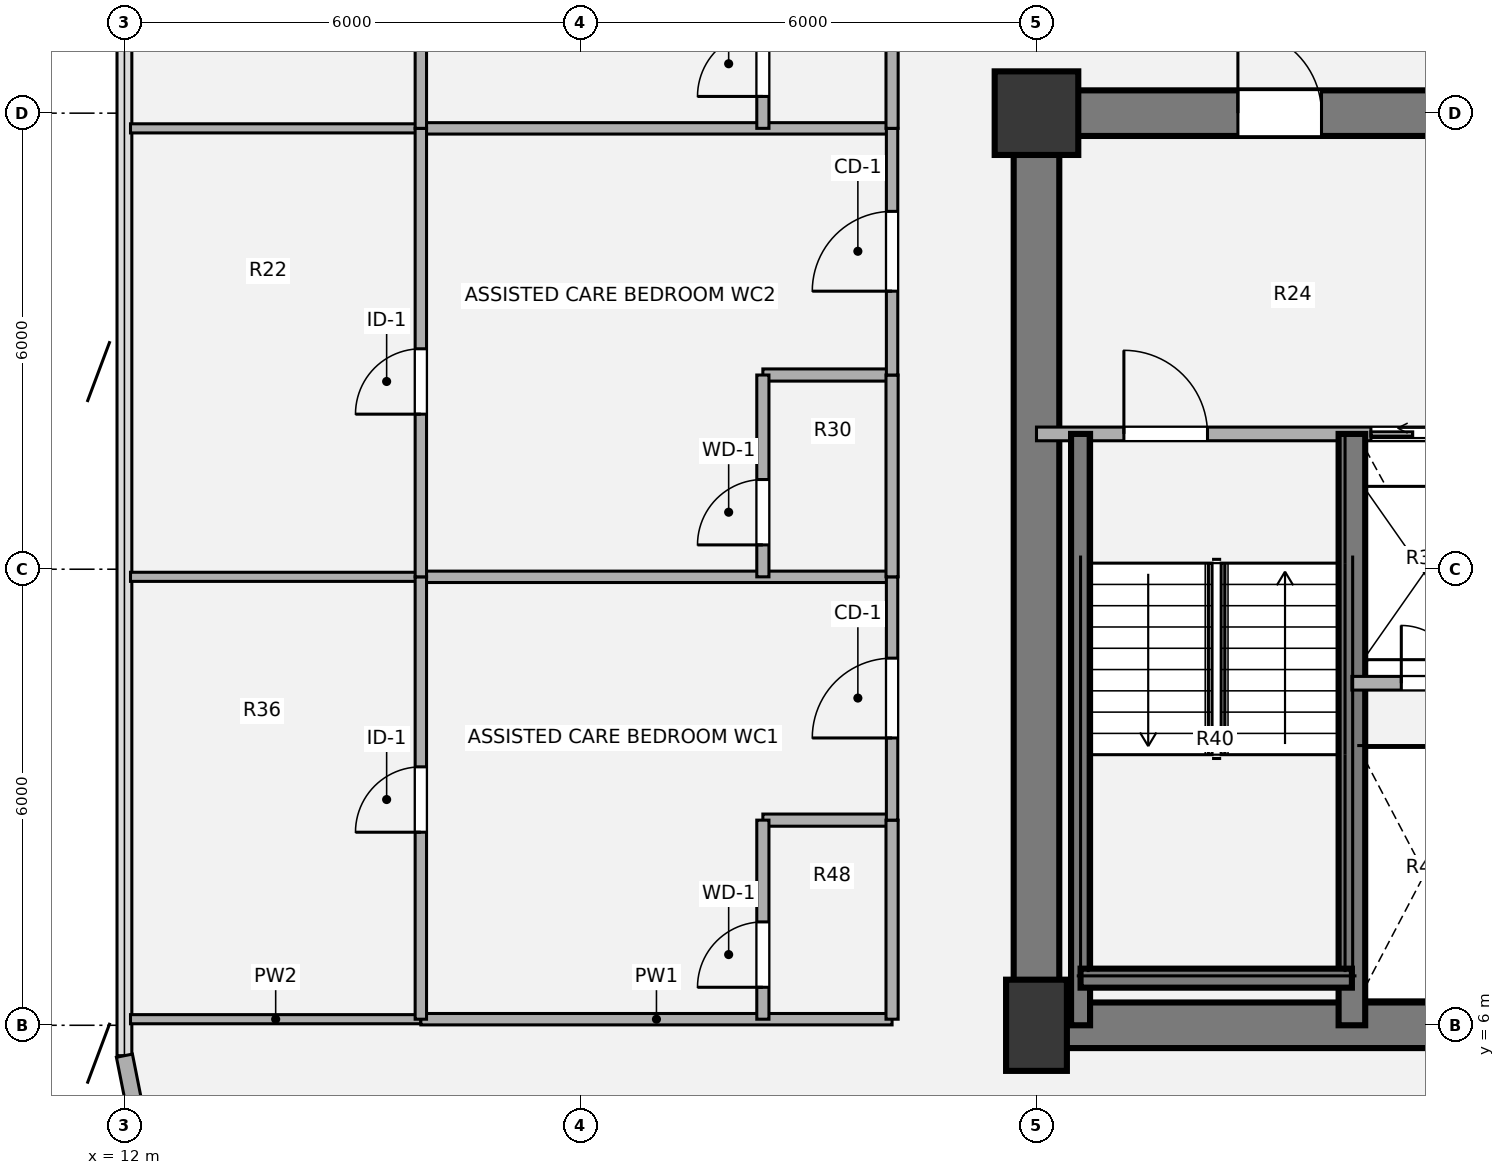
"""IFC4 building model, lengths in metres.
Left out: names, types, materials, properties, quantities, classifications, styles, units other than length and angle.
Written with IfcOpenShell. Run it as: python <this file> out.ifc"""

import sys

from ifc_helpers import new_model, si_unit, direction, frame, frame_2d, origin, origin_2d, place, context, subcontext, project, spatial, rectangle, extrude, source, transform, mapped, element, fill, save


model = new_model("IFC4")
c1 = context("Model", 3, precision=1e-05, world=origin(), true_north=direction((0.0, 1.0)))
c2 = subcontext(c1, "Body", "Model", "MODEL_VIEW")
j1 = project(units=[si_unit("LENGTHUNIT", "METRE"), si_unit("PLANEANGLEUNIT", "RADIAN")], contexts=[c1])
p1 = place(None, origin())
s1 = spatial("IfcSite", under=j1, at=p1, CompositionType="ELEMENT")
p2 = place(p1, origin())
s2 = spatial("IfcBuilding", under=s1, at=p2, CompositionType="ELEMENT")
p3 = place(p2, frame((0.0, 0.0, 38.34)))
s3 = spatial("IfcBuildingStorey", under=s2, at=p3, CompositionType="ELEMENT", Elevation=38.34)
m1 = source(origin(), c2, "Body", "SweptSolid", [
    extrude(rectangle(XDim=0.8, YDim=1.2, at=origin_2d()), origin(), (0.0, 0.0, 1.0), 3.78),
])
p4 = place(p3, frame((24.0, 6.0, 0.0), z_axis=(0.0, 0.0, 1.0), x_axis=(1.0, 0.0, 0.0)))
e1 = element("IfcColumn", 1, at=p4, inside=s3, PredefinedType="COLUMN", context=c2, shape_type="MappedRepresentation", body=[
    mapped(m1, transform((0.0, 0.0, 0.0), x_axis=(1.0, 0.0, 0.0), y_axis=(0.0, 1.0, 0.0), z_axis=(0.0, 0.0, 1.0), scale=1.0)),
])
m2 = source(origin(), c2, "Body", "SweptSolid", [
    extrude(rectangle(XDim=1.1, YDim=1.1, at=origin_2d()), origin(), (0.0, 0.0, 1.0), 3.78),
])
p5 = place(p3, frame((24.0, 18.0, 0.0), z_axis=(0.0, 0.0, 1.0), x_axis=(1.0, 0.0, 0.0)))
e2 = element("IfcColumn", 2, at=p5, inside=s3, PredefinedType="COLUMN", context=c2, shape_type="MappedRepresentation", body=[
    mapped(m2, transform((0.0, 0.0, 0.0), x_axis=(1.0, 0.0, 0.0), y_axis=(0.0, 1.0, 0.0), z_axis=(0.0, 0.0, 1.0), scale=1.0)),
])
p6 = place(p3, frame((48.3, 6.0, 0.0), z_axis=(0.0, 0.0, 1.0), x_axis=(-1.0, 0.0, 0.0)))
e3 = element("IfcWall", 3, at=p6, inside=s3, PredefinedType="SHEAR", context=c2, shape_type="SweptSolid", body=[
    extrude(rectangle(XDim=24.6, YDim=0.6, at=frame_2d((12.3, 0.0))), origin(), (0.0, 0.0, 1.0), 3.78),
])
p7 = place(p3, frame((24.0, 6.0, 0.0), z_axis=(0.0, 0.0, 1.0), x_axis=(0.0, 1.0, 0.0)))
e4 = element("IfcWall", 4, at=p7, inside=s3, PredefinedType="SHEAR", context=c2, shape_type="SweptSolid", body=[
    extrude(rectangle(XDim=12.0, YDim=0.6, at=frame_2d((6.0, 0.0))), origin(), (0.0, 0.0, 1.0), 3.78),
])
p8 = place(p3, frame((23.7, 18.0, 0.0), z_axis=(0.0, 0.0, 1.0), x_axis=(1.0, 0.0, 0.0)))
e5 = element("IfcWall", 5, at=p8, inside=s3, PredefinedType="SHEAR", context=c2, shape_type="SweptSolid", body=[
    extrude(rectangle(XDim=9.5, YDim=0.6, at=frame_2d((4.75, 0.0))), origin(), (0.0, 0.0, 1.0), 3.78),
])
p9 = place(p8, frame((2.95, 0.0, 0.0)))
e6 = element("IfcOpeningElement", 6, at=p9, cuts=e5, PredefinedType="OPENING", context=c2, shape_type="SweptSolid", body=[
    extrude(rectangle(XDim=1.1, YDim=2.1, at=origin_2d()), frame((0.55, 0.31, 1.05), z_axis=(0.0, -1.0, 0.0), x_axis=(1.0, 0.0, 0.0)), (0.0, 0.0, 1.0), 0.62),
])
p10 = place(p3, frame((12.244, 4.375, 0.0), z_axis=(0.0, 0.0, 1.0), x_axis=(-0.195138390419, 0.980775717779, 0.0)))
e7 = element("IfcWall", 7, at=p10, inside=s3, PredefinedType="SOLIDWALL", context=c2, shape_type="SweptSolid", body=[
    extrude(rectangle(XDim=1.249, YDim=0.215, at=frame_2d((0.624, 0.0))), origin(), (0.0, 0.0, 1.0), 3.53),
])
p11 = place(p3, frame((24.0, 13.78, 0.0), z_axis=(0.0, 0.0, 1.0), x_axis=(1.0, 0.0, 0.0)))
e8 = element("IfcWall", 8, at=p11, inside=s3, PredefinedType="PARTITIONING", context=c2, shape_type="SweptSolid", body=[
    extrude(rectangle(XDim=6.1, YDim=0.18, at=frame_2d((3.05, 0.0))), origin(), (0.0, 0.0, 1.0), 3.5),
])
p12 = place(p11, frame((1.15, 0.0, 0.0)))
e9 = element("IfcOpeningElement", 9, at=p12, cuts=e8, PredefinedType="OPENING", context=c2, shape_type="SweptSolid", body=[
    extrude(rectangle(XDim=1.1, YDim=2.1, at=origin_2d()), frame((0.55, 0.1, 1.05), z_axis=(0.0, -1.0, 0.0), x_axis=(1.0, 0.0, 0.0)), (0.0, 0.0, 1.0), 0.2),
])
p13 = place(p11, frame((4.4, 0.0, 0.0)))
e10 = element("IfcOpeningElement", 10, at=p13, cuts=e8, PredefinedType="OPENING", context=c2, shape_type="SweptSolid", body=[
    extrude(rectangle(XDim=1.1, YDim=2.1, at=origin_2d()), frame((0.55, 0.1, 1.05), z_axis=(0.0, -1.0, 0.0), x_axis=(1.0, 0.0, 0.0)), (0.0, 0.0, 1.0), 0.2),
])
p14 = place(p3, frame((28.15, 6.0, 0.0), z_axis=(0.0, 0.0, 1.0), x_axis=(0.0, 1.0, 0.0)))
e11 = element("IfcWall", 11, at=p14, inside=s3, PredefinedType="SHEAR", context=c2, shape_type="SweptSolid", body=[
    extrude(rectangle(XDim=7.78, YDim=0.35, at=frame_2d((3.89, 0.0))), origin(), (0.0, 0.0, 1.0), 3.85),
])
p15 = place(p3, frame((24.58, 6.0, 0.0), z_axis=(0.0, 0.0, 1.0), x_axis=(0.0, 1.0, 0.0)))
e12 = element("IfcWall", 12, at=p15, inside=s3, PredefinedType="SHEAR", context=c2, shape_type="SweptSolid", body=[
    extrude(rectangle(XDim=7.78, YDim=0.25, at=frame_2d((3.89, 0.0))), origin(), (0.0, 0.0, 1.0), 3.85),
])
p16 = place(p3, frame((24.58, 6.62, 0.0), z_axis=(0.0, 0.0, 1.0), x_axis=(1.0, 0.0, 0.0)))
e13 = element("IfcWall", 13, at=p16, inside=s3, PredefinedType="SHEAR", context=c2, shape_type="SweptSolid", body=[
    extrude(rectangle(XDim=3.57, YDim=0.25, at=frame_2d((1.785, 0.0))), origin(), (0.0, 0.0, 1.0), 3.85),
])
p17 = place(p3, frame((28.15, 10.5, 0.0), z_axis=(0.0, 0.0, 1.0), x_axis=(1.0, 0.0, 0.0)))
e14 = element("IfcWall", 14, at=p17, inside=s3, PredefinedType="PARTITIONING", context=c2, shape_type="SweptSolid", body=[
    extrude(rectangle(XDim=1.95, YDim=0.18, at=frame_2d((0.975, 0.0))), origin(), (0.0, 0.0, 1.0), 3.5),
])
p18 = place(p17, frame((0.65, 0.0, 0.0)))
e15 = element("IfcOpeningElement", 15, at=p18, cuts=e14, PredefinedType="OPENING", context=c2, shape_type="SweptSolid", body=[
    extrude(rectangle(XDim=0.76, YDim=2.05, at=origin_2d()), frame((0.38, 0.1, 1.025), z_axis=(0.0, -1.0, 0.0), x_axis=(1.0, 0.0, 0.0)), (0.0, 0.0, 1.0), 0.2),
])
p19 = place(p3, frame((12.08, 6.08, 0.0), z_axis=(0.0, 0.0, 1.0), x_axis=(1.0, 0.0, 0.0)))
e16 = element("IfcWall", 16, at=p19, inside=s3, PredefinedType="PARTITIONING", context=c2, shape_type="SweptSolid", body=[
    extrude(rectangle(XDim=3.82, YDim=0.12, at=frame_2d((1.91, 0.0))), origin(), (0.0, 0.0, 1.0), 3.5),
])
p20 = place(p3, frame((15.9, 6.08, 0.0), z_axis=(0.0, 0.0, 1.0), x_axis=(1.0, 0.0, 0.0)))
e17 = element("IfcWall", 17, at=p20, inside=s3, PredefinedType="PARTITIONING", context=c2, shape_type="SweptSolid", body=[
    extrude(rectangle(XDim=6.2, YDim=0.15, at=frame_2d((3.1, 0.0))), origin(), (0.0, 0.0, 1.0), 3.5),
])
p21 = place(p3, frame((20.4, 8.699, 0.0), z_axis=(0.0, 0.0, 1.0), x_axis=(1.0, 0.0, 0.0)))
e18 = element("IfcWall", 18, at=p21, inside=s3, PredefinedType="PLUMBINGWALL", context=c2, shape_type="SweptSolid", body=[
    extrude(rectangle(XDim=1.7, YDim=0.16, at=frame_2d((0.85, 0.0))), origin(), (0.0, 0.0, 1.0), 3.5),
])
p22 = place(p3, frame((12.08, 11.9, 0.0), z_axis=(0.0, 0.0, 1.0), x_axis=(1.0, 0.0, 0.0)))
e19 = element("IfcWall", 19, at=p22, inside=s3, PredefinedType="PARTITIONING", context=c2, shape_type="SweptSolid", body=[
    extrude(rectangle(XDim=3.82, YDim=0.12, at=frame_2d((1.91, 0.0))), origin(), (0.0, 0.0, 1.0), 3.5),
])
p23 = place(p3, frame((15.9, 11.9, 0.0), z_axis=(0.0, 0.0, 1.0), x_axis=(1.0, 0.0, 0.0)))
e20 = element("IfcWall", 20, at=p23, inside=s3, PredefinedType="PARTITIONING", context=c2, shape_type="SweptSolid", body=[
    extrude(rectangle(XDim=6.2, YDim=0.15, at=frame_2d((3.1, 0.0))), origin(), (0.0, 0.0, 1.0), 3.5),
])
p24 = place(p3, frame((20.4, 14.555, 0.0), z_axis=(0.0, 0.0, 1.0), x_axis=(1.0, 0.0, 0.0)))
e21 = element("IfcWall", 21, at=p24, inside=s3, PredefinedType="PLUMBINGWALL", context=c2, shape_type="SweptSolid", body=[
    extrude(rectangle(XDim=1.7, YDim=0.16, at=frame_2d((0.85, 0.0))), origin(), (0.0, 0.0, 1.0), 3.5),
])
p25 = place(p3, frame((12.08, 17.8, 0.0), z_axis=(0.0, 0.0, 1.0), x_axis=(1.0, 0.0, 0.0)))
e22 = element("IfcWall", 22, at=p25, inside=s3, PredefinedType="PARTITIONING", context=c2, shape_type="SweptSolid", body=[
    extrude(rectangle(XDim=3.82, YDim=0.12, at=frame_2d((1.91, 0.0))), origin(), (0.0, 0.0, 1.0), 3.5),
])
p26 = place(p3, frame((15.9, 17.8, 0.0), z_axis=(0.0, 0.0, 1.0), x_axis=(1.0, 0.0, 0.0)))
e23 = element("IfcWall", 23, at=p26, inside=s3, PredefinedType="PARTITIONING", context=c2, shape_type="SweptSolid", body=[
    extrude(rectangle(XDim=6.2, YDim=0.15, at=frame_2d((3.1, 0.0))), origin(), (0.0, 0.0, 1.0), 3.5),
])
p27 = place(p3, frame((15.9, 6.08, 0.0), z_axis=(0.0, 0.0, 1.0), x_axis=(0.0, 1.0, 0.0)))
e24 = element("IfcWall", 24, at=p27, inside=s3, PredefinedType="PARTITIONING", context=c2, shape_type="SweptSolid", body=[
    extrude(rectangle(XDim=5.82, YDim=0.15, at=frame_2d((2.91, 0.0))), origin(), (0.0, 0.0, 1.0), 3.5),
])
p28 = place(p27, frame((2.46, 0.0, 0.0)))
e25 = element("IfcOpeningElement", 25, at=p28, cuts=e24, PredefinedType="OPENING", context=c2, shape_type="SweptSolid", body=[
    extrude(rectangle(XDim=0.86, YDim=2.1, at=origin_2d()), frame((0.43, 0.085, 1.05), z_axis=(0.0, -1.0, 0.0), x_axis=(1.0, 0.0, 0.0)), (0.0, 0.0, 1.0), 0.17),
])
p29 = place(p3, frame((15.9, 11.9, 0.0), z_axis=(0.0, 0.0, 1.0), x_axis=(0.0, 1.0, 0.0)))
e26 = element("IfcWall", 26, at=p29, inside=s3, PredefinedType="PARTITIONING", context=c2, shape_type="SweptSolid", body=[
    extrude(rectangle(XDim=5.9, YDim=0.15, at=frame_2d((2.95, 0.0))), origin(), (0.0, 0.0, 1.0), 3.5),
])
p30 = place(p29, frame((2.14, 0.0, 0.0)))
e27 = element("IfcOpeningElement", 27, at=p30, cuts=e26, PredefinedType="OPENING", context=c2, shape_type="SweptSolid", body=[
    extrude(rectangle(XDim=0.86, YDim=2.1, at=origin_2d()), frame((0.43, 0.085, 1.05), z_axis=(0.0, -1.0, 0.0), x_axis=(1.0, 0.0, 0.0)), (0.0, 0.0, 1.0), 0.17),
])
p31 = place(p3, frame((15.9, 17.8, 0.0), z_axis=(0.0, 0.0, 1.0), x_axis=(0.0, 1.0, 0.0)))
e28 = element("IfcWall", 28, at=p31, inside=s3, PredefinedType="PARTITIONING", context=c2, shape_type="SweptSolid", body=[
    extrude(rectangle(XDim=5.9, YDim=0.15, at=frame_2d((2.95, 0.0))), origin(), (0.0, 0.0, 1.0), 3.5),
])
p32 = place(p31, frame((3.44, 0.0, 0.0)))
e29 = element("IfcOpeningElement", 29, at=p32, cuts=e28, PredefinedType="OPENING", context=c2, shape_type="SweptSolid", body=[
    extrude(rectangle(XDim=0.86, YDim=2.1, at=origin_2d()), frame((0.43, 0.085, 1.05), z_axis=(0.0, -1.0, 0.0), x_axis=(1.0, 0.0, 0.0)), (0.0, 0.0, 1.0), 0.17),
])
p33 = place(p3, frame((20.4, 6.08, 0.0), z_axis=(0.0, 0.0, 1.0), x_axis=(0.0, 1.0, 0.0)))
e30 = element("IfcWall", 30, at=p33, inside=s3, PredefinedType="PLUMBINGWALL", context=c2, shape_type="SweptSolid", body=[
    extrude(rectangle(XDim=2.619, YDim=0.16, at=frame_2d((1.31, 0.0))), origin(), (0.0, 0.0, 1.0), 3.5),
])
p34 = place(p33, frame((0.42, 0.0, 0.0)))
e31 = element("IfcOpeningElement", 31, at=p34, cuts=e30, PredefinedType="OPENING", context=c2, shape_type="SweptSolid", body=[
    extrude(rectangle(XDim=0.86, YDim=2.1, at=origin_2d()), frame((0.43, 0.09, 1.05), z_axis=(0.0, -1.0, 0.0), x_axis=(1.0, 0.0, 0.0)), (0.0, 0.0, 1.0), 0.18),
])
p35 = place(p3, frame((20.4, 11.9, 0.0), z_axis=(0.0, 0.0, 1.0), x_axis=(0.0, 1.0, 0.0)))
e32 = element("IfcWall", 32, at=p35, inside=s3, PredefinedType="PLUMBINGWALL", context=c2, shape_type="SweptSolid", body=[
    extrude(rectangle(XDim=2.655, YDim=0.16, at=frame_2d((1.328, 0.0))), origin(), (0.0, 0.0, 1.0), 3.5),
])
p36 = place(p35, frame((0.42, 0.0, 0.0)))
e33 = element("IfcOpeningElement", 33, at=p36, cuts=e32, PredefinedType="OPENING", context=c2, shape_type="SweptSolid", body=[
    extrude(rectangle(XDim=0.86, YDim=2.1, at=origin_2d()), frame((0.43, 0.09, 1.05), z_axis=(0.0, -1.0, 0.0), x_axis=(1.0, 0.0, 0.0)), (0.0, 0.0, 1.0), 0.18),
])
p37 = place(p3, frame((20.4, 17.8, 0.0), z_axis=(0.0, 0.0, 1.0), x_axis=(0.0, 1.0, 0.0)))
e34 = element("IfcWall", 34, at=p37, inside=s3, PredefinedType="PLUMBINGWALL", context=c2, shape_type="SweptSolid", body=[
    extrude(rectangle(XDim=2.655, YDim=0.16, at=frame_2d((1.328, 0.0))), origin(), (0.0, 0.0, 1.0), 3.5),
])
p38 = place(p37, frame((0.42, 0.0, 0.0)))
e35 = element("IfcOpeningElement", 35, at=p38, cuts=e34, PredefinedType="OPENING", context=c2, shape_type="SweptSolid", body=[
    extrude(rectangle(XDim=0.86, YDim=2.1, at=origin_2d()), frame((0.43, 0.09, 1.05), z_axis=(0.0, -1.0, 0.0), x_axis=(1.0, 0.0, 0.0)), (0.0, 0.0, 1.0), 0.18),
])
p39 = place(p3, frame((22.1, 6.08, 0.0), z_axis=(0.0, 0.0, 1.0), x_axis=(0.0, 1.0, 0.0)))
e36 = element("IfcWall", 36, at=p39, inside=s3, PredefinedType="PLUMBINGWALL", context=c2, shape_type="SweptSolid", body=[
    extrude(rectangle(XDim=2.619, YDim=0.16, at=frame_2d((1.31, 0.0))), origin(), (0.0, 0.0, 1.0), 3.5),
])
p40 = place(p3, frame((22.1, 8.699, 0.0), z_axis=(0.0, 0.0, 1.0), x_axis=(0.0, 1.0, 0.0)))
e37 = element("IfcWall", 37, at=p40, inside=s3, PredefinedType="PARTITIONING", context=c2, shape_type="SweptSolid", body=[
    extrude(rectangle(XDim=3.201, YDim=0.15, at=frame_2d((1.601, 0.0))), origin(), (0.0, 0.0, 1.0), 3.5),
])
p41 = place(p40, frame((1.081, 0.0, 0.0)))
e38 = element("IfcOpeningElement", 38, at=p41, cuts=e37, PredefinedType="OPENING", context=c2, shape_type="SweptSolid", body=[
    extrude(rectangle(XDim=1.05, YDim=2.1, at=origin_2d()), frame((0.525, 0.085, 1.05), z_axis=(0.0, -1.0, 0.0), x_axis=(1.0, 0.0, 0.0)), (0.0, 0.0, 1.0), 0.17),
])
p42 = place(p3, frame((22.1, 11.9, 0.0), z_axis=(0.0, 0.0, 1.0), x_axis=(0.0, 1.0, 0.0)))
e39 = element("IfcWall", 39, at=p42, inside=s3, PredefinedType="PLUMBINGWALL", context=c2, shape_type="SweptSolid", body=[
    extrude(rectangle(XDim=2.655, YDim=0.16, at=frame_2d((1.328, 0.0))), origin(), (0.0, 0.0, 1.0), 3.5),
])
p43 = place(p3, frame((22.1, 14.555, 0.0), z_axis=(0.0, 0.0, 1.0), x_axis=(0.0, 1.0, 0.0)))
e40 = element("IfcWall", 40, at=p43, inside=s3, PredefinedType="PARTITIONING", context=c2, shape_type="SweptSolid", body=[
    extrude(rectangle(XDim=3.245, YDim=0.15, at=frame_2d((1.623, 0.0))), origin(), (0.0, 0.0, 1.0), 3.5),
])
p44 = place(p43, frame((1.103, 0.0, 0.0)))
e41 = element("IfcOpeningElement", 41, at=p44, cuts=e40, PredefinedType="OPENING", context=c2, shape_type="SweptSolid", body=[
    extrude(rectangle(XDim=1.05, YDim=2.1, at=origin_2d()), frame((0.525, 0.085, 1.05), z_axis=(0.0, -1.0, 0.0), x_axis=(1.0, 0.0, 0.0)), (0.0, 0.0, 1.0), 0.17),
])
p45 = place(p3, frame((22.1, 17.8, 0.0), z_axis=(0.0, 0.0, 1.0), x_axis=(0.0, 1.0, 0.0)))
e42 = element("IfcWall", 42, at=p45, inside=s3, PredefinedType="PLUMBINGWALL", context=c2, shape_type="SweptSolid", body=[
    extrude(rectangle(XDim=2.655, YDim=0.16, at=frame_2d((1.328, 0.0))), origin(), (0.0, 0.0, 1.0), 3.5),
])
m3 = source(origin(), c2, "Body", "SweptSolid", [
    extrude(rectangle(XDim=1.1, YDim=2.1, at=origin_2d()), frame((0.55, 0.025, 1.05), z_axis=(0.0, -1.0, 0.0), x_axis=(1.0, 0.0, 0.0)), (0.0, 0.0, 1.0), 0.05),
])
p46 = place(p12, origin())
e43 = element("IfcDoor", 43, at=p46, inside=s3, OperationType="SINGLE_SWING_LEFT", PredefinedType="DOOR", context=c2, shape_type="MappedRepresentation", body=[
    mapped(m3, transform((0.0, 0.0, 0.0), x_axis=(1.0, 0.0, 0.0), y_axis=(0.0, 1.0, 0.0), z_axis=(0.0, 0.0, 1.0), scale=1.0)),
])
fill(e9, e43)
m4 = source(origin(), c2, "Body", "SweptSolid", [
    extrude(rectangle(XDim=1.1, YDim=2.1, at=origin_2d()), frame((0.55, 0.025, 1.05), z_axis=(0.0, -1.0, 0.0), x_axis=(1.0, 0.0, 0.0)), (0.0, 0.0, 1.0), 0.05),
])
p47 = place(p13, origin())
e44 = element("IfcDoor", 44, at=p47, inside=s3, OperationType="SLIDING_TO_LEFT", PredefinedType="DOOR", context=c2, shape_type="MappedRepresentation", body=[
    mapped(m4, transform((0.0, 0.0, 0.0), x_axis=(1.0, 0.0, 0.0), y_axis=(0.0, 1.0, 0.0), z_axis=(0.0, 0.0, 1.0), scale=1.0)),
])
fill(e10, e44)
m5 = source(origin(), c2, "Body", "SweptSolid", [
    extrude(rectangle(XDim=0.76, YDim=2.05, at=origin_2d()), frame((0.38, 0.025, 1.025), z_axis=(0.0, -1.0, 0.0), x_axis=(1.0, 0.0, 0.0)), (0.0, 0.0, 1.0), 0.05),
])
p48 = place(p18, origin())
e45 = element("IfcDoor", 45, at=p48, inside=s3, OperationType="SINGLE_SWING_LEFT", PredefinedType="DOOR", context=c2, shape_type="MappedRepresentation", body=[
    mapped(m5, transform((0.0, 0.0, 0.0), x_axis=(1.0, 0.0, 0.0), y_axis=(0.0, 1.0, 0.0), z_axis=(0.0, 0.0, 1.0), scale=1.0)),
])
fill(e15, e45)
m6 = source(origin(), c2, "Body", "SweptSolid", [
    extrude(rectangle(XDim=1.1, YDim=2.1, at=origin_2d()), frame((0.55, 0.025, 1.05), z_axis=(0.0, -1.0, 0.0), x_axis=(1.0, 0.0, 0.0)), (0.0, 0.0, 1.0), 0.05),
])
p49 = place(p9, origin())
e46 = element("IfcDoor", 46, at=p49, inside=s3, OperationType="SINGLE_SWING_LEFT", PredefinedType="DOOR", context=c2, shape_type="MappedRepresentation", body=[
    mapped(m6, transform((0.0, 0.0, 0.0), x_axis=(1.0, 0.0, 0.0), y_axis=(0.0, 1.0, 0.0), z_axis=(0.0, 0.0, 1.0), scale=1.0)),
])
fill(e6, e46)
m7 = source(origin(), c2, "Body", "SweptSolid", [
    extrude(rectangle(XDim=0.86, YDim=2.1, at=origin_2d()), frame((0.43, 0.025, 1.05), z_axis=(0.0, -1.0, 0.0), x_axis=(1.0, 0.0, 0.0)), (0.0, 0.0, 1.0), 0.05),
])
p50 = place(p28, origin())
e47 = element("IfcDoor", 47, at=p50, inside=s3, OperationType="SINGLE_SWING_LEFT", PredefinedType="DOOR", context=c2, shape_type="MappedRepresentation", body=[
    mapped(m7, transform((0.0, 0.0, 0.0), x_axis=(1.0, 0.0, 0.0), y_axis=(0.0, 1.0, 0.0), z_axis=(0.0, 0.0, 1.0), scale=1.0)),
])
fill(e25, e47)
p51 = place(p30, origin())
e48 = element("IfcDoor", 48, at=p51, inside=s3, OperationType="SINGLE_SWING_LEFT", PredefinedType="DOOR", context=c2, shape_type="MappedRepresentation", body=[
    mapped(m7, transform((0.0, 0.0, 0.0), x_axis=(1.0, 0.0, 0.0), y_axis=(0.0, 1.0, 0.0), z_axis=(0.0, 0.0, 1.0), scale=1.0)),
])
fill(e27, e48)
m8 = source(origin(), c2, "Body", "SweptSolid", [
    extrude(rectangle(XDim=0.86, YDim=2.1, at=origin_2d()), frame((0.43, 0.025, 1.05), z_axis=(0.0, -1.0, 0.0), x_axis=(1.0, 0.0, 0.0)), (0.0, 0.0, 1.0), 0.05),
])
p52 = place(p34, origin())
e49 = element("IfcDoor", 49, at=p52, inside=s3, OperationType="SINGLE_SWING_LEFT", PredefinedType="DOOR", context=c2, shape_type="MappedRepresentation", body=[
    mapped(m8, transform((0.0, 0.0, 0.0), x_axis=(1.0, 0.0, 0.0), y_axis=(0.0, 1.0, 0.0), z_axis=(0.0, 0.0, 1.0), scale=1.0)),
])
fill(e31, e49)
p53 = place(p36, origin())
e50 = element("IfcDoor", 50, at=p53, inside=s3, OperationType="SINGLE_SWING_LEFT", PredefinedType="DOOR", context=c2, shape_type="MappedRepresentation", body=[
    mapped(m8, transform((0.0, 0.0, 0.0), x_axis=(1.0, 0.0, 0.0), y_axis=(0.0, 1.0, 0.0), z_axis=(0.0, 0.0, 1.0), scale=1.0)),
])
fill(e33, e50)
p54 = place(p38, origin())
e51 = element("IfcDoor", 51, at=p54, inside=s3, OperationType="SINGLE_SWING_LEFT", PredefinedType="DOOR", context=c2, shape_type="MappedRepresentation", body=[
    mapped(m8, transform((0.0, 0.0, 0.0), x_axis=(1.0, 0.0, 0.0), y_axis=(0.0, 1.0, 0.0), z_axis=(0.0, 0.0, 1.0), scale=1.0)),
])
fill(e35, e51)
m9 = source(origin(), c2, "Body", "SweptSolid", [
    extrude(rectangle(XDim=1.05, YDim=2.1, at=origin_2d()), frame((0.525, 0.025, 1.05), z_axis=(0.0, -1.0, 0.0), x_axis=(1.0, 0.0, 0.0)), (0.0, 0.0, 1.0), 0.05),
])
p55 = place(p41, origin())
e52 = element("IfcDoor", 52, at=p55, inside=s3, OperationType="SINGLE_SWING_LEFT", PredefinedType="DOOR", context=c2, shape_type="MappedRepresentation", body=[
    mapped(m9, transform((0.0, 0.0, 0.0), x_axis=(1.0, 0.0, 0.0), y_axis=(0.0, 1.0, 0.0), z_axis=(0.0, 0.0, 1.0), scale=1.0)),
])
fill(e38, e52)
p56 = place(p44, origin())
e53 = element("IfcDoor", 53, at=p56, inside=s3, OperationType="SINGLE_SWING_LEFT", PredefinedType="DOOR", context=c2, shape_type="MappedRepresentation", body=[
    mapped(m9, transform((0.0, 0.0, 0.0), x_axis=(1.0, 0.0, 0.0), y_axis=(0.0, 1.0, 0.0), z_axis=(0.0, 0.0, 1.0), scale=1.0)),
])
fill(e41, e53)
save(model, sys.argv[1])
